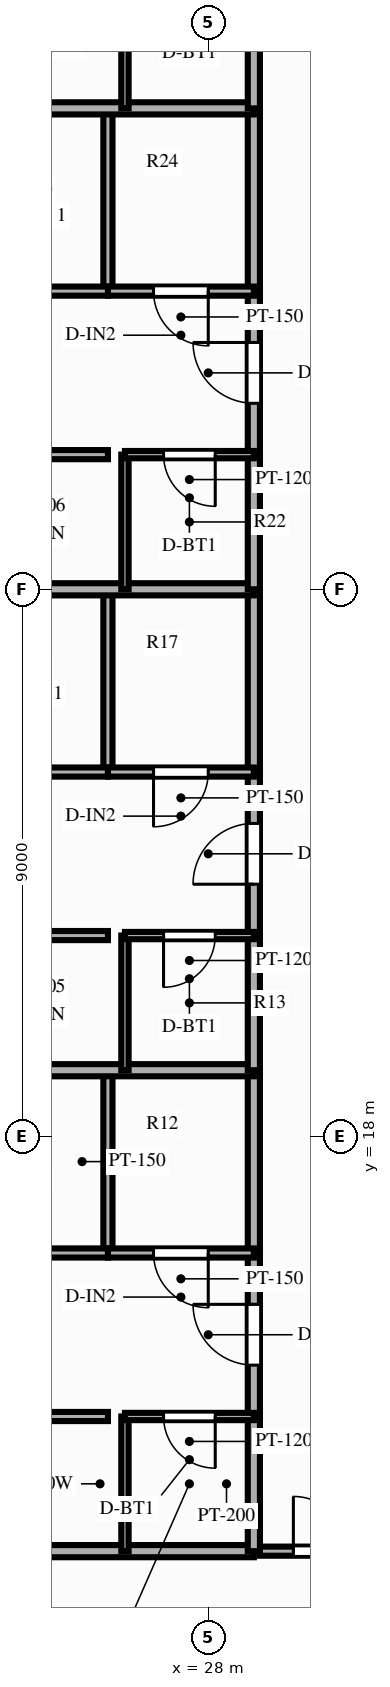
"""IFC4 building model, lengths in metres.
Left out: names, types, materials, properties, quantities, classifications, styles, units other than length and angle.
Written with IfcOpenShell. Run it as: python <this file> out.ifc"""

import sys

from ifc_helpers import new_model, si_unit, direction, frame, frame_2d, origin, place, context, subcontext, project, spatial, rectangle, extrude, source, transform, mapped, element, fill, save


model = new_model("IFC4")
c1 = context("Model", 3, precision=1e-05, world=origin(), true_north=direction((0.0, 1.0)))
c2 = subcontext(c1, "Body", "Model", "MODEL_VIEW")
j1 = project(units=[si_unit("LENGTHUNIT", "METRE"), si_unit("PLANEANGLEUNIT", "RADIAN")], contexts=[c1])
p1 = place(None, origin())
s1 = spatial("IfcSite", under=j1, at=p1, CompositionType="ELEMENT")
p2 = place(p1, origin())
s2 = spatial("IfcBuilding", under=s1, at=p2, CompositionType="ELEMENT")
p3 = place(p2, frame((0.0, 0.0, 186.7)))
s3 = spatial("IfcBuildingStorey", under=s2, at=p3, CompositionType="ELEMENT", Elevation=186.7)
p4 = place(p3, frame((28.85, 11.18, 0.0), z_axis=(0.0, 0.0, 1.0), x_axis=(1.0, 0.0, 0.0)))
e1 = element("IfcWall", 1, at=p4, inside=s3, PredefinedType="PARTITIONING", context=c2, shape_type="SweptSolid", body=[
    extrude(rectangle(XDim=2.33, YDim=0.15, at=frame_2d((1.165, 0.0))), origin(), (0.0, 0.0, 1.0), 2.79),
])
p5 = place(p4, frame((0.55, 0.0, 0.0)))
e2 = element("IfcOpeningElement", 2, at=p5, cuts=e1, PredefinedType="OPENING", context=c2, shape_type="SweptSolid", body=[
    extrude(rectangle(XDim=0.9, YDim=2.1, at=frame_2d((0.45, 1.05))), frame((0.0, 0.087, 0.0), z_axis=(0.0, -1.0, 0.0), x_axis=(1.0, 0.0, 0.0)), (0.0, 0.0, 1.0), 0.174),
])
p6 = place(p3, frame((28.75, 11.18, 0.0), z_axis=(0.0, 0.0, 1.0), x_axis=(-1.0, 0.0, 0.0)))
e3 = element("IfcWall", 3, at=p6, inside=s3, PredefinedType="PARTITIONING", context=c2, shape_type="SweptSolid", body=[
    extrude(rectangle(XDim=10.85, YDim=0.2, at=frame_2d((5.425, 0.0))), origin(), (0.0, 0.0, 1.0), 2.79),
])
p7 = place(p3, frame((28.75, 11.18, 0.0), z_axis=(0.0, 0.0, 1.0), x_axis=(0.0, 1.0, 0.0)))
e4 = element("IfcWall", 4, at=p7, inside=s3, PredefinedType="PARTITIONING", context=c2, shape_type="SweptSolid", body=[
    extrude(rectangle(XDim=2.215, YDim=0.2, at=frame_2d((1.107, 0.0))), origin(), (0.0, 0.0, 1.0), 2.79),
])
p8 = place(p3, frame((28.75, 13.395, 0.0), z_axis=(0.0, 0.0, 1.0), x_axis=(0.0, 1.0, 0.0)))
e5 = element("IfcWall", 5, at=p8, inside=s3, PredefinedType="PARTITIONING", context=c2, shape_type="SweptSolid", body=[
    extrude(rectangle(XDim=2.689, YDim=0.2, at=frame_2d((1.345, 0.0))), origin(), (0.0, 0.0, 1.0), 2.79),
])
p9 = place(p8, frame((0.845, 0.0, 0.0)))
e6 = element("IfcOpeningElement", 6, at=p9, cuts=e5, PredefinedType="OPENING", context=c2, shape_type="SweptSolid", body=[
    extrude(rectangle(XDim=1.0, YDim=2.15, at=frame_2d((0.5, 1.075))), frame((0.0, 0.112, 0.0), z_axis=(0.0, -1.0, 0.0), x_axis=(1.0, 0.0, 0.0)), (0.0, 0.0, 1.0), 0.224),
])
p10 = place(p3, frame((28.75, 16.084, 0.0), z_axis=(0.0, 0.0, 1.0), x_axis=(0.0, 1.0, 0.0)))
e7 = element("IfcWall", 7, at=p10, inside=s3, PredefinedType="PARTITIONING", context=c2, shape_type="SweptSolid", body=[
    extrude(rectangle(XDim=3.006, YDim=0.2, at=frame_2d((1.503, 0.0))), origin(), (0.0, 0.0, 1.0), 2.79),
])
p11 = place(p3, frame((26.63, 11.18, 0.0), z_axis=(0.0, 0.0, 1.0), x_axis=(0.0, 1.0, 0.0)))
e8 = element("IfcWall", 8, at=p11, inside=s3, PredefinedType="PARTITIONING", context=c2, shape_type="SweptSolid", body=[
    extrude(rectangle(XDim=2.215, YDim=0.12, at=frame_2d((1.107, 0.0))), origin(), (0.0, 0.0, 1.0), 2.79),
])
p12 = place(p3, frame((26.35, 16.084, 0.0), z_axis=(0.0, 0.0, 1.0), x_axis=(0.0, 1.0, 0.0)))
e9 = element("IfcWall", 9, at=p12, inside=s3, PredefinedType="PARTITIONING", context=c2, shape_type="SweptSolid", body=[
    extrude(rectangle(XDim=3.006, YDim=0.15, at=frame_2d((1.503, 0.0))), origin(), (0.0, 0.0, 1.0), 2.79),
])
p13 = place(p3, frame((28.75, 13.395, 0.0), z_axis=(0.0, 0.0, 1.0), x_axis=(-1.0, 0.0, 0.0)))
e10 = element("IfcWall", 10, at=p13, inside=s3, PredefinedType="PARTITIONING", context=c2, shape_type="SweptSolid", body=[
    extrude(rectangle(XDim=2.12, YDim=0.12, at=frame_2d((1.06, 0.0))), origin(), (0.0, 0.0, 1.0), 2.79),
])
p14 = place(p13, frame((0.635, 0.0, 0.0)))
e11 = element("IfcOpeningElement", 11, at=p14, cuts=e10, PredefinedType="OPENING", context=c2, shape_type="SweptSolid", body=[
    extrude(rectangle(XDim=0.85, YDim=2.05, at=frame_2d((0.425, 1.025))), frame((0.0, 0.072, 0.0), z_axis=(0.0, -1.0, 0.0), x_axis=(1.0, 0.0, 0.0)), (0.0, 0.0, 1.0), 0.144),
])
p15 = place(p3, frame((26.35, 13.395, 0.0), z_axis=(0.0, 0.0, 1.0), x_axis=(-1.0, 0.0, 0.0)))
e12 = element("IfcWall", 12, at=p15, inside=s3, PredefinedType="PARTITIONING", context=c2, shape_type="SweptSolid", body=[
    extrude(rectangle(XDim=8.45, YDim=0.15, at=frame_2d((4.225, 0.0))), origin(), (0.0, 0.0, 1.0), 2.79),
])
p16 = place(p15, frame((3.48, 0.0, 0.0)))
e13 = element("IfcOpeningElement", 13, at=p16, cuts=e12, PredefinedType="OPENING", context=c2, shape_type="SweptSolid", body=[
    extrude(rectangle(XDim=0.9, YDim=2.1, at=frame_2d((0.45, 1.05))), frame((0.0, 0.087, 0.0), z_axis=(0.0, -1.0, 0.0), x_axis=(1.0, 0.0, 0.0)), (0.0, 0.0, 1.0), 0.174),
])
p17 = place(p3, frame((28.75, 16.084, 0.0), z_axis=(0.0, 0.0, 1.0), x_axis=(-1.0, 0.0, 0.0)))
e14 = element("IfcWall", 14, at=p17, inside=s3, PredefinedType="PARTITIONING", context=c2, shape_type="SweptSolid", body=[
    extrude(rectangle(XDim=2.4, YDim=0.15, at=frame_2d((1.2, 0.0))), origin(), (0.0, 0.0, 1.0), 2.79),
])
p18 = place(p17, frame((0.75, 0.0, 0.0)))
e15 = element("IfcOpeningElement", 15, at=p18, cuts=e14, PredefinedType="OPENING", context=c2, shape_type="SweptSolid", body=[
    extrude(rectangle(XDim=0.9, YDim=2.1, at=frame_2d((0.45, 1.05))), frame((0.0, 0.087, 0.0), z_axis=(0.0, -1.0, 0.0), x_axis=(1.0, 0.0, 0.0)), (0.0, 0.0, 1.0), 0.174),
])
p19 = place(p3, frame((26.35, 16.084, 0.0), z_axis=(0.0, 0.0, 1.0), x_axis=(-1.0, 0.0, 0.0)))
e16 = element("IfcWall", 16, at=p19, inside=s3, PredefinedType="PARTITIONING", context=c2, shape_type="SweptSolid", body=[
    extrude(rectangle(XDim=8.45, YDim=0.15, at=frame_2d((4.225, 0.0))), origin(), (0.0, 0.0, 1.0), 2.79),
])
p20 = place(p19, frame((3.48, 0.0, 0.0)))
e17 = element("IfcOpeningElement", 17, at=p20, cuts=e16, PredefinedType="OPENING", context=c2, shape_type="SweptSolid", body=[
    extrude(rectangle(XDim=0.9, YDim=2.1, at=frame_2d((0.45, 1.05))), frame((0.0, 0.087, 0.0), z_axis=(0.0, -1.0, 0.0), x_axis=(1.0, 0.0, 0.0)), (0.0, 0.0, 1.0), 0.174),
])
p21 = place(p3, frame((28.75, 19.09, 0.0), z_axis=(0.0, 0.0, 1.0), x_axis=(-1.0, 0.0, 0.0)))
e18 = element("IfcWall", 18, at=p21, inside=s3, PredefinedType="PARTITIONING", context=c2, shape_type="SweptSolid", body=[
    extrude(rectangle(XDim=10.85, YDim=0.2, at=frame_2d((5.425, 0.0))), origin(), (0.0, 0.0, 1.0), 2.79),
])
p22 = place(p3, frame((28.75, 19.09, 0.0), z_axis=(0.0, 0.0, 1.0), x_axis=(0.0, 1.0, 0.0)))
e19 = element("IfcWall", 19, at=p22, inside=s3, PredefinedType="PARTITIONING", context=c2, shape_type="SweptSolid", body=[
    extrude(rectangle(XDim=2.215, YDim=0.2, at=frame_2d((1.107, 0.0))), origin(), (0.0, 0.0, 1.0), 2.79),
])
p23 = place(p3, frame((28.75, 21.305, 0.0), z_axis=(0.0, 0.0, 1.0), x_axis=(0.0, 1.0, 0.0)))
e20 = element("IfcWall", 20, at=p23, inside=s3, PredefinedType="PARTITIONING", context=c2, shape_type="SweptSolid", body=[
    extrude(rectangle(XDim=2.689, YDim=0.2, at=frame_2d((1.345, 0.0))), origin(), (0.0, 0.0, 1.0), 2.79),
])
p24 = place(p23, frame((0.845, 0.0, 0.0)))
e21 = element("IfcOpeningElement", 21, at=p24, cuts=e20, PredefinedType="OPENING", context=c2, shape_type="SweptSolid", body=[
    extrude(rectangle(XDim=1.0, YDim=2.15, at=frame_2d((0.5, 1.075))), frame((0.0, 0.112, 0.0), z_axis=(0.0, -1.0, 0.0), x_axis=(1.0, 0.0, 0.0)), (0.0, 0.0, 1.0), 0.224),
])
p25 = place(p3, frame((28.75, 23.994, 0.0), z_axis=(0.0, 0.0, 1.0), x_axis=(0.0, 1.0, 0.0)))
e22 = element("IfcWall", 22, at=p25, inside=s3, PredefinedType="PARTITIONING", context=c2, shape_type="SweptSolid", body=[
    extrude(rectangle(XDim=3.006, YDim=0.2, at=frame_2d((1.503, 0.0))), origin(), (0.0, 0.0, 1.0), 2.79),
])
p26 = place(p3, frame((26.63, 19.09, 0.0), z_axis=(0.0, 0.0, 1.0), x_axis=(0.0, 1.0, 0.0)))
e23 = element("IfcWall", 23, at=p26, inside=s3, PredefinedType="PARTITIONING", context=c2, shape_type="SweptSolid", body=[
    extrude(rectangle(XDim=2.215, YDim=0.12, at=frame_2d((1.107, 0.0))), origin(), (0.0, 0.0, 1.0), 2.79),
])
p27 = place(p3, frame((26.35, 23.994, 0.0), z_axis=(0.0, 0.0, 1.0), x_axis=(0.0, 1.0, 0.0)))
e24 = element("IfcWall", 24, at=p27, inside=s3, PredefinedType="PARTITIONING", context=c2, shape_type="SweptSolid", body=[
    extrude(rectangle(XDim=3.006, YDim=0.15, at=frame_2d((1.503, 0.0))), origin(), (0.0, 0.0, 1.0), 2.79),
])
p28 = place(p3, frame((28.75, 21.305, 0.0), z_axis=(0.0, 0.0, 1.0), x_axis=(-1.0, 0.0, 0.0)))
e25 = element("IfcWall", 25, at=p28, inside=s3, PredefinedType="PARTITIONING", context=c2, shape_type="SweptSolid", body=[
    extrude(rectangle(XDim=2.12, YDim=0.12, at=frame_2d((1.06, 0.0))), origin(), (0.0, 0.0, 1.0), 2.79),
])
p29 = place(p28, frame((0.635, 0.0, 0.0)))
e26 = element("IfcOpeningElement", 26, at=p29, cuts=e25, PredefinedType="OPENING", context=c2, shape_type="SweptSolid", body=[
    extrude(rectangle(XDim=0.85, YDim=2.05, at=frame_2d((0.425, 1.025))), frame((0.0, 0.072, 0.0), z_axis=(0.0, -1.0, 0.0), x_axis=(1.0, 0.0, 0.0)), (0.0, 0.0, 1.0), 0.144),
])
p30 = place(p3, frame((26.35, 21.305, 0.0), z_axis=(0.0, 0.0, 1.0), x_axis=(-1.0, 0.0, 0.0)))
e27 = element("IfcWall", 27, at=p30, inside=s3, PredefinedType="PARTITIONING", context=c2, shape_type="SweptSolid", body=[
    extrude(rectangle(XDim=8.45, YDim=0.15, at=frame_2d((4.225, 0.0))), origin(), (0.0, 0.0, 1.0), 2.79),
])
p31 = place(p30, frame((3.48, 0.0, 0.0)))
e28 = element("IfcOpeningElement", 28, at=p31, cuts=e27, PredefinedType="OPENING", context=c2, shape_type="SweptSolid", body=[
    extrude(rectangle(XDim=0.9, YDim=2.1, at=frame_2d((0.45, 1.05))), frame((0.0, 0.087, 0.0), z_axis=(0.0, -1.0, 0.0), x_axis=(1.0, 0.0, 0.0)), (0.0, 0.0, 1.0), 0.174),
])
p32 = place(p3, frame((28.75, 23.994, 0.0), z_axis=(0.0, 0.0, 1.0), x_axis=(-1.0, 0.0, 0.0)))
e29 = element("IfcWall", 29, at=p32, inside=s3, PredefinedType="PARTITIONING", context=c2, shape_type="SweptSolid", body=[
    extrude(rectangle(XDim=2.4, YDim=0.15, at=frame_2d((1.2, 0.0))), origin(), (0.0, 0.0, 1.0), 2.79),
])
p33 = place(p32, frame((0.75, 0.0, 0.0)))
e30 = element("IfcOpeningElement", 30, at=p33, cuts=e29, PredefinedType="OPENING", context=c2, shape_type="SweptSolid", body=[
    extrude(rectangle(XDim=0.9, YDim=2.1, at=frame_2d((0.45, 1.05))), frame((0.0, 0.087, 0.0), z_axis=(0.0, -1.0, 0.0), x_axis=(1.0, 0.0, 0.0)), (0.0, 0.0, 1.0), 0.174),
])
p34 = place(p3, frame((26.35, 23.994, 0.0), z_axis=(0.0, 0.0, 1.0), x_axis=(-1.0, 0.0, 0.0)))
e31 = element("IfcWall", 31, at=p34, inside=s3, PredefinedType="PARTITIONING", context=c2, shape_type="SweptSolid", body=[
    extrude(rectangle(XDim=8.45, YDim=0.15, at=frame_2d((4.225, 0.0))), origin(), (0.0, 0.0, 1.0), 2.79),
])
p35 = place(p34, frame((3.48, 0.0, 0.0)))
e32 = element("IfcOpeningElement", 32, at=p35, cuts=e31, PredefinedType="OPENING", context=c2, shape_type="SweptSolid", body=[
    extrude(rectangle(XDim=0.9, YDim=2.1, at=frame_2d((0.45, 1.05))), frame((0.0, 0.087, 0.0), z_axis=(0.0, -1.0, 0.0), x_axis=(1.0, 0.0, 0.0)), (0.0, 0.0, 1.0), 0.174),
])
p36 = place(p3, frame((28.75, 27.0, 0.0), z_axis=(0.0, 0.0, 1.0), x_axis=(-1.0, 0.0, 0.0)))
e33 = element("IfcWall", 33, at=p36, inside=s3, PredefinedType="PARTITIONING", context=c2, shape_type="SweptSolid", body=[
    extrude(rectangle(XDim=10.85, YDim=0.2, at=frame_2d((5.425, 0.0))), origin(), (0.0, 0.0, 1.0), 2.79),
])
p37 = place(p3, frame((28.75, 27.0, 0.0), z_axis=(0.0, 0.0, 1.0), x_axis=(0.0, 1.0, 0.0)))
e34 = element("IfcWall", 34, at=p37, inside=s3, PredefinedType="PARTITIONING", context=c2, shape_type="SweptSolid", body=[
    extrude(rectangle(XDim=2.215, YDim=0.2, at=frame_2d((1.107, 0.0))), origin(), (0.0, 0.0, 1.0), 2.79),
])
p38 = place(p3, frame((28.75, 29.215, 0.0), z_axis=(0.0, 0.0, 1.0), x_axis=(0.0, 1.0, 0.0)))
e35 = element("IfcWall", 35, at=p38, inside=s3, PredefinedType="PARTITIONING", context=c2, shape_type="SweptSolid", body=[
    extrude(rectangle(XDim=2.689, YDim=0.2, at=frame_2d((1.345, 0.0))), origin(), (0.0, 0.0, 1.0), 2.79),
])
p39 = place(p38, frame((0.845, 0.0, 0.0)))
e36 = element("IfcOpeningElement", 36, at=p39, cuts=e35, PredefinedType="OPENING", context=c2, shape_type="SweptSolid", body=[
    extrude(rectangle(XDim=1.0, YDim=2.15, at=frame_2d((0.5, 1.075))), frame((0.0, 0.112, 0.0), z_axis=(0.0, -1.0, 0.0), x_axis=(1.0, 0.0, 0.0)), (0.0, 0.0, 1.0), 0.224),
])
p40 = place(p3, frame((28.75, 31.904, 0.0), z_axis=(0.0, 0.0, 1.0), x_axis=(0.0, 1.0, 0.0)))
e37 = element("IfcWall", 37, at=p40, inside=s3, PredefinedType="PARTITIONING", context=c2, shape_type="SweptSolid", body=[
    extrude(rectangle(XDim=3.006, YDim=0.2, at=frame_2d((1.503, 0.0))), origin(), (0.0, 0.0, 1.0), 2.79),
])
p41 = place(p3, frame((26.63, 27.0, 0.0), z_axis=(0.0, 0.0, 1.0), x_axis=(0.0, 1.0, 0.0)))
e38 = element("IfcWall", 38, at=p41, inside=s3, PredefinedType="PARTITIONING", context=c2, shape_type="SweptSolid", body=[
    extrude(rectangle(XDim=2.215, YDim=0.12, at=frame_2d((1.107, 0.0))), origin(), (0.0, 0.0, 1.0), 2.79),
])
p42 = place(p3, frame((26.35, 31.904, 0.0), z_axis=(0.0, 0.0, 1.0), x_axis=(0.0, 1.0, 0.0)))
e39 = element("IfcWall", 39, at=p42, inside=s3, PredefinedType="PARTITIONING", context=c2, shape_type="SweptSolid", body=[
    extrude(rectangle(XDim=3.006, YDim=0.15, at=frame_2d((1.503, 0.0))), origin(), (0.0, 0.0, 1.0), 2.79),
])
p43 = place(p3, frame((28.75, 29.215, 0.0), z_axis=(0.0, 0.0, 1.0), x_axis=(-1.0, 0.0, 0.0)))
e40 = element("IfcWall", 40, at=p43, inside=s3, PredefinedType="PARTITIONING", context=c2, shape_type="SweptSolid", body=[
    extrude(rectangle(XDim=2.12, YDim=0.12, at=frame_2d((1.06, 0.0))), origin(), (0.0, 0.0, 1.0), 2.79),
])
p44 = place(p43, frame((0.635, 0.0, 0.0)))
e41 = element("IfcOpeningElement", 41, at=p44, cuts=e40, PredefinedType="OPENING", context=c2, shape_type="SweptSolid", body=[
    extrude(rectangle(XDim=0.85, YDim=2.05, at=frame_2d((0.425, 1.025))), frame((0.0, 0.072, 0.0), z_axis=(0.0, -1.0, 0.0), x_axis=(1.0, 0.0, 0.0)), (0.0, 0.0, 1.0), 0.144),
])
p45 = place(p3, frame((26.35, 29.215, 0.0), z_axis=(0.0, 0.0, 1.0), x_axis=(-1.0, 0.0, 0.0)))
e42 = element("IfcWall", 42, at=p45, inside=s3, PredefinedType="PARTITIONING", context=c2, shape_type="SweptSolid", body=[
    extrude(rectangle(XDim=8.45, YDim=0.15, at=frame_2d((4.225, 0.0))), origin(), (0.0, 0.0, 1.0), 2.79),
])
p46 = place(p45, frame((3.48, 0.0, 0.0)))
e43 = element("IfcOpeningElement", 43, at=p46, cuts=e42, PredefinedType="OPENING", context=c2, shape_type="SweptSolid", body=[
    extrude(rectangle(XDim=0.9, YDim=2.1, at=frame_2d((0.45, 1.05))), frame((0.0, 0.087, 0.0), z_axis=(0.0, -1.0, 0.0), x_axis=(1.0, 0.0, 0.0)), (0.0, 0.0, 1.0), 0.174),
])
p47 = place(p3, frame((28.75, 31.904, 0.0), z_axis=(0.0, 0.0, 1.0), x_axis=(-1.0, 0.0, 0.0)))
e44 = element("IfcWall", 44, at=p47, inside=s3, PredefinedType="PARTITIONING", context=c2, shape_type="SweptSolid", body=[
    extrude(rectangle(XDim=2.4, YDim=0.15, at=frame_2d((1.2, 0.0))), origin(), (0.0, 0.0, 1.0), 2.39),
])
p48 = place(p47, frame((0.75, 0.0, 0.0)))
e45 = element("IfcOpeningElement", 45, at=p48, cuts=e44, PredefinedType="OPENING", context=c2, shape_type="SweptSolid", body=[
    extrude(rectangle(XDim=0.9, YDim=2.1, at=frame_2d((0.45, 1.05))), frame((0.0, 0.087, 0.0), z_axis=(0.0, -1.0, 0.0), x_axis=(1.0, 0.0, 0.0)), (0.0, 0.0, 1.0), 0.174),
])
p49 = place(p3, frame((26.35, 31.904, 0.0), z_axis=(0.0, 0.0, 1.0), x_axis=(-1.0, 0.0, 0.0)))
e46 = element("IfcWall", 46, at=p49, inside=s3, PredefinedType="PARTITIONING", context=c2, shape_type="SweptSolid", body=[
    extrude(rectangle(XDim=8.45, YDim=0.15, at=frame_2d((4.225, 0.0))), origin(), (0.0, 0.0, 1.0), 2.39),
])
p50 = place(p49, frame((3.48, 0.0, 0.0)))
e47 = element("IfcOpeningElement", 47, at=p50, cuts=e46, PredefinedType="OPENING", context=c2, shape_type="SweptSolid", body=[
    extrude(rectangle(XDim=0.9, YDim=2.1, at=frame_2d((0.45, 1.05))), frame((0.0, 0.087, 0.0), z_axis=(0.0, -1.0, 0.0), x_axis=(1.0, 0.0, 0.0)), (0.0, 0.0, 1.0), 0.174),
])
p51 = place(p3, frame((28.75, 34.91, 0.0), z_axis=(0.0, 0.0, 1.0), x_axis=(-1.0, 0.0, 0.0)))
e48 = element("IfcWall", 48, at=p51, inside=s3, PredefinedType="PARTITIONING", context=c2, shape_type="SweptSolid", body=[
    extrude(rectangle(XDim=10.85, YDim=0.2, at=frame_2d((5.425, 0.0))), origin(), (0.0, 0.0, 1.0), 2.79),
])
p52 = place(p3, frame((28.75, 34.91, 0.0), z_axis=(0.0, 0.0, 1.0), x_axis=(0.0, 1.0, 0.0)))
e49 = element("IfcWall", 49, at=p52, inside=s3, PredefinedType="PARTITIONING", context=c2, shape_type="SweptSolid", body=[
    extrude(rectangle(XDim=2.41, YDim=0.2, at=frame_2d((1.205, 0.0))), origin(), (0.0, 0.0, 1.0), 2.79),
])
p53 = place(p3, frame((26.63, 34.91, 0.0), z_axis=(0.0, 0.0, 1.0), x_axis=(0.0, 1.0, 0.0)))
e50 = element("IfcWall", 50, at=p53, inside=s3, PredefinedType="PARTITIONING", context=c2, shape_type="SweptSolid", body=[
    extrude(rectangle(XDim=2.41, YDim=0.12, at=frame_2d((1.205, 0.0))), origin(), (0.0, 0.0, 1.0), 2.79),
])
m1 = source(origin(), c2, "Body", "SweptSolid", [
    extrude(rectangle(XDim=0.9, YDim=2.1, at=frame_2d((0.45, 1.05))), frame((0.0, 0.025, 0.0), z_axis=(0.0, -1.0, 0.0), x_axis=(1.0, 0.0, 0.0)), (0.0, 0.0, 1.0), 0.05),
])
p54 = place(p5, origin())
e51 = element("IfcDoor", 51, at=p54, inside=s3, OperationType="SINGLE_SWING_LEFT", PredefinedType="DOOR", context=c2, shape_type="MappedRepresentation", body=[
    mapped(m1, transform((0.0, 0.0, 0.0), scale=1.0)),
])
fill(e2, e51)
m2 = source(origin(), c2, "Body", "SweptSolid", [
    extrude(rectangle(XDim=1.0, YDim=2.15, at=frame_2d((0.5, 1.075))), frame((0.0, 0.025, 0.0), z_axis=(0.0, -1.0, 0.0), x_axis=(1.0, 0.0, 0.0)), (0.0, 0.0, 1.0), 0.05),
])
p55 = place(p9, origin())
e52 = element("IfcDoor", 52, at=p55, inside=s3, OperationType="SINGLE_SWING_RIGHT", PredefinedType="DOOR", context=c2, shape_type="MappedRepresentation", body=[
    mapped(m2, transform((0.0, 0.0, 0.0), scale=1.0)),
])
fill(e6, e52)
m3 = source(origin(), c2, "Body", "SweptSolid", [
    extrude(rectangle(XDim=0.85, YDim=2.05, at=frame_2d((0.425, 1.025))), frame((0.0, 0.025, 0.0), z_axis=(0.0, -1.0, 0.0), x_axis=(1.0, 0.0, 0.0)), (0.0, 0.0, 1.0), 0.05),
])
p56 = place(p14, origin())
e53 = element("IfcDoor", 53, at=p56, inside=s3, OperationType="SINGLE_SWING_LEFT", PredefinedType="DOOR", context=c2, shape_type="MappedRepresentation", body=[
    mapped(m3, transform((0.0, 0.0, 0.0), scale=1.0)),
])
fill(e11, e53)
p57 = place(p18, origin())
e54 = element("IfcDoor", 54, at=p57, inside=s3, OperationType="SINGLE_SWING_LEFT", PredefinedType="DOOR", context=c2, shape_type="MappedRepresentation", body=[
    mapped(m1, transform((0.0, 0.0, 0.0), scale=1.0)),
])
fill(e15, e54)
p58 = place(p24, origin())
e55 = element("IfcDoor", 55, at=p58, inside=s3, OperationType="SINGLE_SWING_LEFT", PredefinedType="DOOR", context=c2, shape_type="MappedRepresentation", body=[
    mapped(m2, transform((0.0, 0.0, 0.0), scale=1.0)),
])
fill(e21, e55)
p59 = place(p29, origin())
e56 = element("IfcDoor", 56, at=p59, inside=s3, OperationType="SINGLE_SWING_RIGHT", PredefinedType="DOOR", context=c2, shape_type="MappedRepresentation", body=[
    mapped(m3, transform((0.0, 0.0, 0.0), scale=1.0)),
])
fill(e26, e56)
p60 = place(p33, origin())
e57 = element("IfcDoor", 57, at=p60, inside=s3, OperationType="SINGLE_SWING_RIGHT", PredefinedType="DOOR", context=c2, shape_type="MappedRepresentation", body=[
    mapped(m1, transform((0.0, 0.0, 0.0), scale=1.0)),
])
fill(e30, e57)
p61 = place(p39, origin())
e58 = element("IfcDoor", 58, at=p61, inside=s3, OperationType="SINGLE_SWING_RIGHT", PredefinedType="DOOR", context=c2, shape_type="MappedRepresentation", body=[
    mapped(m2, transform((0.0, 0.0, 0.0), scale=1.0)),
])
fill(e36, e58)
p62 = place(p44, origin())
e59 = element("IfcDoor", 59, at=p62, inside=s3, OperationType="SINGLE_SWING_LEFT", PredefinedType="DOOR", context=c2, shape_type="MappedRepresentation", body=[
    mapped(m3, transform((0.0, 0.0, 0.0), scale=1.0)),
])
fill(e41, e59)
p63 = place(p48, origin())
e60 = element("IfcDoor", 60, at=p63, inside=s3, OperationType="SINGLE_SWING_LEFT", PredefinedType="DOOR", context=c2, shape_type="MappedRepresentation", body=[
    mapped(m1, transform((0.0, 0.0, 0.0), scale=1.0)),
])
fill(e45, e60)
save(model, sys.argv[1])
